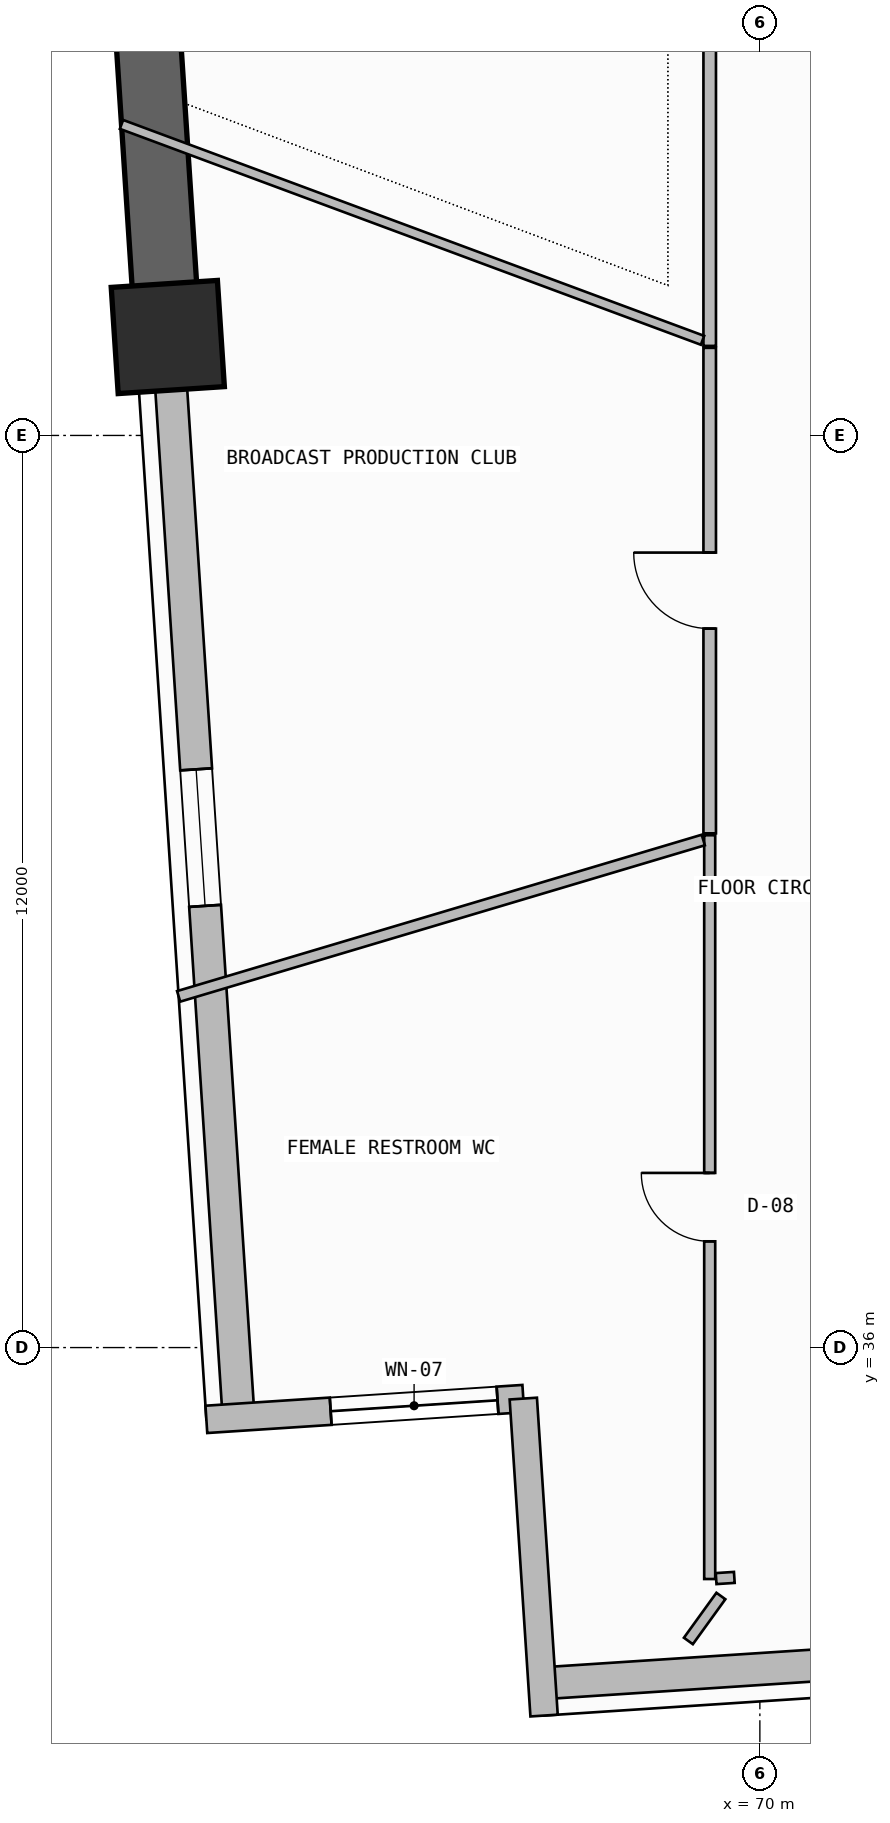
"""IFC4 building model, lengths in metres.
Left out: names, types, materials, properties, quantities, classifications, styles, units other than length and angle.
Written with IfcOpenShell. Run it as: python <this file> out.ifc"""

import sys

from ifc_helpers import new_model, si_unit, direction, frame, frame_2d, origin, origin_2d, place, context, subcontext, project, spatial, rectangle, extrude, element, fill, save


model = new_model("IFC4")
c1 = context("Model", 3, precision=1e-05, world=origin(), true_north=direction((0.0, 1.0)))
c2 = subcontext(c1, "Body", "Model", "MODEL_VIEW")
j1 = project(units=[si_unit("LENGTHUNIT", "METRE"), si_unit("PLANEANGLEUNIT", "RADIAN")], contexts=[c1])
p1 = place(None, origin())
s1 = spatial("IfcSite", under=j1, at=p1, CompositionType="ELEMENT")
p2 = place(p1, origin())
s2 = spatial("IfcBuilding", under=s1, at=p2, CompositionType="ELEMENT")
p3 = place(p2, frame((0.0, 0.0, 70.5)))
s3 = spatial("IfcBuildingStorey", under=s2, at=p3, CompositionType="ELEMENT", Elevation=70.5)
p4 = place(p3, frame((62.21, 49.295, 0.0), z_axis=(0.0, 0.0, 1.0), x_axis=(-0.06540312923, 0.997858923239, 0.0)))
e1 = element("IfcColumn", 1, at=p4, inside=s3, PredefinedType="COLUMN", context=c2, shape_type="SweptSolid", body=[
    extrude(rectangle(XDim=1.4, YDim=1.4, at=origin_2d()), origin(), (0.0, 0.0, 1.0), 3.6),
])
p5 = place(p3, frame((67.133, 31.583, 0.0), z_axis=(0.0, 0.0, 1.0), x_axis=(0.997859040617, 0.065401338356, 0.0)))
e2 = element("IfcWall", 2, at=p5, inside=s3, PredefinedType="SOLIDWALL", context=c2, shape_type="SweptSolid", body=[
    extrude(rectangle(XDim=17.862, YDim=0.42, at=frame_2d((8.931, 0.0))), origin(), (0.0, 0.0, 1.0), 2.325),
])
p6 = place(p5, frame((5.7, 0.0, 1.2)))
e3 = element("IfcOpeningElement", 3, at=p6, cuts=e2, PredefinedType="OPENING", context=c2, shape_type="SweptSolid", body=[
    extrude(rectangle(XDim=2.4, YDim=0.9, at=frame_2d((1.2, 0.45))), frame((0.0, 0.22, 0.0), z_axis=(0.0, -1.0, 0.0), x_axis=(1.0, 0.0, 0.0)), (0.0, 0.0, 1.0), 0.44),
])
p7 = place(p3, frame((60.785, 71.031, -0.26), z_axis=(0.0, 0.0, 1.0), x_axis=(0.065409824833, -0.997858484363, 0.0)))
e4 = element("IfcWall", 4, at=p7, inside=s3, PredefinedType="SHEAR", context=c2, shape_type="SweptSolid", body=[
    extrude(rectangle(XDim=21.783, YDim=0.85, at=frame_2d((10.891, 0.0))), origin(), (0.0, 0.0, 1.0), 3.6),
])
p8 = place(p7, frame((9.2, 0.0, 1.2)))
e5 = element("IfcOpeningElement", 5, at=p8, cuts=e4, PredefinedType="OPENING", context=c2, shape_type="SweptSolid", body=[
    extrude(rectangle(XDim=1.8, YDim=0.9, at=frame_2d((0.9, 0.45))), frame((0.0, 0.435, 0.0), z_axis=(0.0, -1.0, 0.0), x_axis=(1.0, 0.0, 0.0)), (0.0, 0.0, 1.0), 0.87),
])
p9 = place(p3, frame((62.21, 49.295, 0.0), z_axis=(0.0, 0.0, 1.0), x_axis=(0.065396027757, -0.997859388668, 0.0)))
e6 = element("IfcWall", 6, at=p9, inside=s3, PredefinedType="SOLIDWALL", context=c2, shape_type="SweptSolid", body=[
    extrude(rectangle(XDim=14.242, YDim=0.42, at=frame_2d((7.121, 0.0))), origin(), (0.0, 0.0, 1.0), 2.325),
])
p10 = place(p9, frame((5.7, 0.0, 1.2)))
e7 = element("IfcOpeningElement", 7, at=p10, cuts=e6, PredefinedType="OPENING", context=c2, shape_type="SweptSolid", body=[
    extrude(rectangle(XDim=1.8, YDim=0.9, at=frame_2d((0.9, 0.45))), frame((0.0, 0.22, 0.0), z_axis=(0.0, -1.0, 0.0), x_axis=(1.0, 0.0, 0.0)), (0.0, 0.0, 1.0), 0.44),
])
p11 = place(p3, frame((62.718, 35.055, 0.0), z_axis=(0.0, 0.0, 1.0), x_axis=(0.997860761953, 0.065375069826, 0.0)))
e8 = element("IfcWall", 8, at=p11, inside=s3, PredefinedType="SOLIDWALL", context=c2, shape_type="SweptSolid", body=[
    extrude(rectangle(XDim=4.179, YDim=0.36, at=frame_2d((2.089, 0.0))), origin(), (0.0, 0.0, 1.0), 3.34),
])
p12 = place(p11, frame((1.639, 0.0, 0.45)))
e9 = element("IfcOpeningElement", 9, at=p12, cuts=e8, PredefinedType="OPENING", context=c2, shape_type="SweptSolid", body=[
    extrude(rectangle(XDim=2.2, YDim=2.4, at=frame_2d((1.1, 1.2))), frame((0.0, 0.19, 0.0), z_axis=(0.0, -1.0, 0.0), x_axis=(1.0, 0.0, 0.0)), (0.0, 0.0, 1.0), 0.38),
])
p13 = place(p3, frame((66.887, 35.329, 0.0), z_axis=(0.0, 0.0, 1.0), x_axis=(0.065433242561, -0.99785694905, 0.0)))
e10 = element("IfcWall", 10, at=p13, inside=s3, PredefinedType="SOLIDWALL", context=c2, shape_type="SweptSolid", body=[
    extrude(rectangle(XDim=4.179, YDim=0.36, at=frame_2d((2.089, 0.0))), origin(), (0.0, 0.0, 1.0), 3.34),
])
p14 = place(p3, frame((69.34, 42.74, 0.0), z_axis=(0.0, 0.0, 1.0), x_axis=(0.0, -1.0, 0.0)))
e11 = element("IfcWall", 11, at=p14, inside=s3, PredefinedType="PARTITIONING", context=c2, shape_type="SweptSolid", body=[
    extrude(rectangle(XDim=9.785, YDim=0.145, at=frame_2d((4.893, 0.0))), origin(), (0.0, 0.0, 1.0), 3.34),
])
p15 = place(p14, frame((4.443, 0.0, 0.0)))
e12 = element("IfcOpeningElement", 12, at=p15, cuts=e11, PredefinedType="OPENING", context=c2, shape_type="SweptSolid", body=[
    extrude(rectangle(XDim=0.9, YDim=2.1, at=frame_2d((0.45, 1.05))), frame((0.0, 0.083, 0.0), z_axis=(0.0, -1.0, 0.0), x_axis=(1.0, 0.0, 0.0)), (0.0, 0.0, 1.0), 0.165),
])
p16 = place(p3, frame((69.425, 32.96, 0.0), z_axis=(0.0, 0.0, 1.0), x_axis=(0.997807626554, 0.066181118088, 0.0)))
e13 = element("IfcWall", 13, at=p16, inside=s3, PredefinedType="PARTITIONING", context=c2, shape_type="SweptSolid", body=[
    extrude(rectangle(XDim=0.24, YDim=0.145, at=frame_2d((0.12, 0.0))), origin(), (0.0, 0.0, 1.0), 3.34),
])
p17 = place(p3, frame((62.353, 40.62, 0.0), z_axis=(0.0, 0.0, 1.0), x_axis=(0.958348975983, 0.285599790324, 0.0)))
e14 = element("IfcWall", 14, at=p17, inside=s3, PredefinedType="PARTITIONING", context=c2, shape_type="SweptSolid", body=[
    extrude(rectangle(XDim=7.203, YDim=0.145, at=frame_2d((3.602, 0.0))), origin(), (0.0, 0.0, 1.0), 3.34),
])
p18 = place(p3, frame((69.34, 59.06, 0.0), z_axis=(0.0, 0.0, 1.0), x_axis=(0.0, -1.0, 0.0)))
e15 = element("IfcWall", 15, at=p18, inside=s3, PredefinedType="PARTITIONING", context=c2, shape_type="SweptSolid", body=[
    extrude(rectangle(XDim=9.882, YDim=0.165, at=frame_2d((4.941, 0.0))), origin(), (0.0, 0.0, 1.0), 2.725),
])
p19 = place(p18, frame((4.441, 0.0, 0.0)))
e16 = element("IfcOpeningElement", 16, at=p19, cuts=e15, PredefinedType="OPENING", context=c2, shape_type="SweptSolid", body=[
    extrude(rectangle(XDim=1.0, YDim=2.2, at=frame_2d((0.5, 1.1))), frame((0.0, 0.093, 0.0), z_axis=(0.0, -1.0, 0.0), x_axis=(1.0, 0.0, 0.0)), (0.0, 0.0, 1.0), 0.185),
])
p20 = place(p3, frame((69.246, 49.252, 0.0), z_axis=(0.0, 0.0, 1.0), x_axis=(-0.937391487393, 0.34827747467, 0.0)))
e17 = element("IfcWall", 17, at=p20, inside=s3, PredefinedType="PARTITIONING", context=c2, shape_type="SweptSolid", body=[
    extrude(rectangle(XDim=8.155, YDim=0.125, at=frame_2d((4.078, 0.0))), origin(), (0.0, 0.0, 1.0), 2.325),
])
p21 = place(p3, frame((69.34, 49.152, 0.0), z_axis=(0.0, 0.0, 1.0), x_axis=(0.0, -1.0, 0.0)))
e18 = element("IfcWall", 18, at=p21, inside=s3, PredefinedType="PARTITIONING", context=c2, shape_type="SweptSolid", body=[
    extrude(rectangle(XDim=6.387, YDim=0.165, at=frame_2d((3.193, 0.0))), origin(), (0.0, 0.0, 1.0), 3.34),
])
p22 = place(p21, frame((2.694, 0.0, 0.0)))
e19 = element("IfcOpeningElement", 19, at=p22, cuts=e18, PredefinedType="OPENING", context=c2, shape_type="SweptSolid", body=[
    extrude(rectangle(XDim=1.0, YDim=2.2, at=frame_2d((0.5, 1.1))), frame((0.0, 0.093, 0.0), z_axis=(0.0, -1.0, 0.0), x_axis=(1.0, 0.0, 0.0)), (0.0, 0.0, 1.0), 0.185),
])
p23 = place(p3, frame((69.487, 32.732, 0.0), z_axis=(0.0, 0.0, 1.0), x_axis=(-0.585563811117, -0.810626315333, 0.0)))
e20 = element("IfcWall", 20, at=p23, inside=s3, PredefinedType="PARTITIONING", context=c2, shape_type="SweptSolid", body=[
    extrude(rectangle(XDim=0.73, YDim=0.145, at=frame_2d((0.365, 0.0))), origin(), (0.0, 0.0, 1.0), 3.34),
])
p24 = place(p10, origin())
e21 = element("IfcWindow", 21, at=p24, inside=s3, PartitioningType="SINGLE_PANEL", PredefinedType="WINDOW", context=c2, shape_type="SweptSolid", body=[
    extrude(rectangle(XDim=1.8, YDim=0.9, at=frame_2d((0.9, 0.45))), frame((0.0, 0.03, 0.0), z_axis=(0.0, -1.0, 0.0), x_axis=(1.0, 0.0, 0.0)), (0.0, 0.0, 1.0), 0.06),
])
fill(e7, e21)
p25 = place(p12, origin())
e22 = element("IfcWindow", 22, at=p25, inside=s3, PartitioningType="SINGLE_PANEL", PredefinedType="WINDOW", context=c2, shape_type="SweptSolid", body=[
    extrude(rectangle(XDim=2.2, YDim=2.4, at=frame_2d((1.1, 1.2))), frame((0.0, 0.03, 0.0), z_axis=(0.0, -1.0, 0.0), x_axis=(1.0, 0.0, 0.0)), (0.0, 0.0, 1.0), 0.06),
])
fill(e9, e22)
p26 = place(p15, frame((0.9, 0.0, 0.0), z_axis=(0.0, 0.0, 1.0), x_axis=(-1.0, 0.0, 0.0)))
e23 = element("IfcDoor", 23, at=p26, inside=s3, OperationType="SINGLE_SWING_RIGHT", PredefinedType="DOOR", context=c2, shape_type="SweptSolid", body=[
    extrude(rectangle(XDim=0.9, YDim=2.1, at=frame_2d((0.45, 1.05))), frame((0.0, 0.025, 0.0), z_axis=(0.0, -1.0, 0.0), x_axis=(1.0, 0.0, 0.0)), (0.0, 0.0, 1.0), 0.05),
])
fill(e12, e23)
p27 = place(p22, frame((1.0, 0.0, 0.0), z_axis=(0.0, 0.0, 1.0), x_axis=(-1.0, 0.0, 0.0)))
e24 = element("IfcDoor", 24, at=p27, inside=s3, OperationType="SINGLE_SWING_RIGHT", PredefinedType="DOOR", context=c2, shape_type="SweptSolid", body=[
    extrude(rectangle(XDim=1.0, YDim=2.2, at=frame_2d((0.5, 1.1))), frame((0.0, 0.025, 0.0), z_axis=(0.0, -1.0, 0.0), x_axis=(1.0, 0.0, 0.0)), (0.0, 0.0, 1.0), 0.05),
])
fill(e19, e24)
save(model, sys.argv[1])
